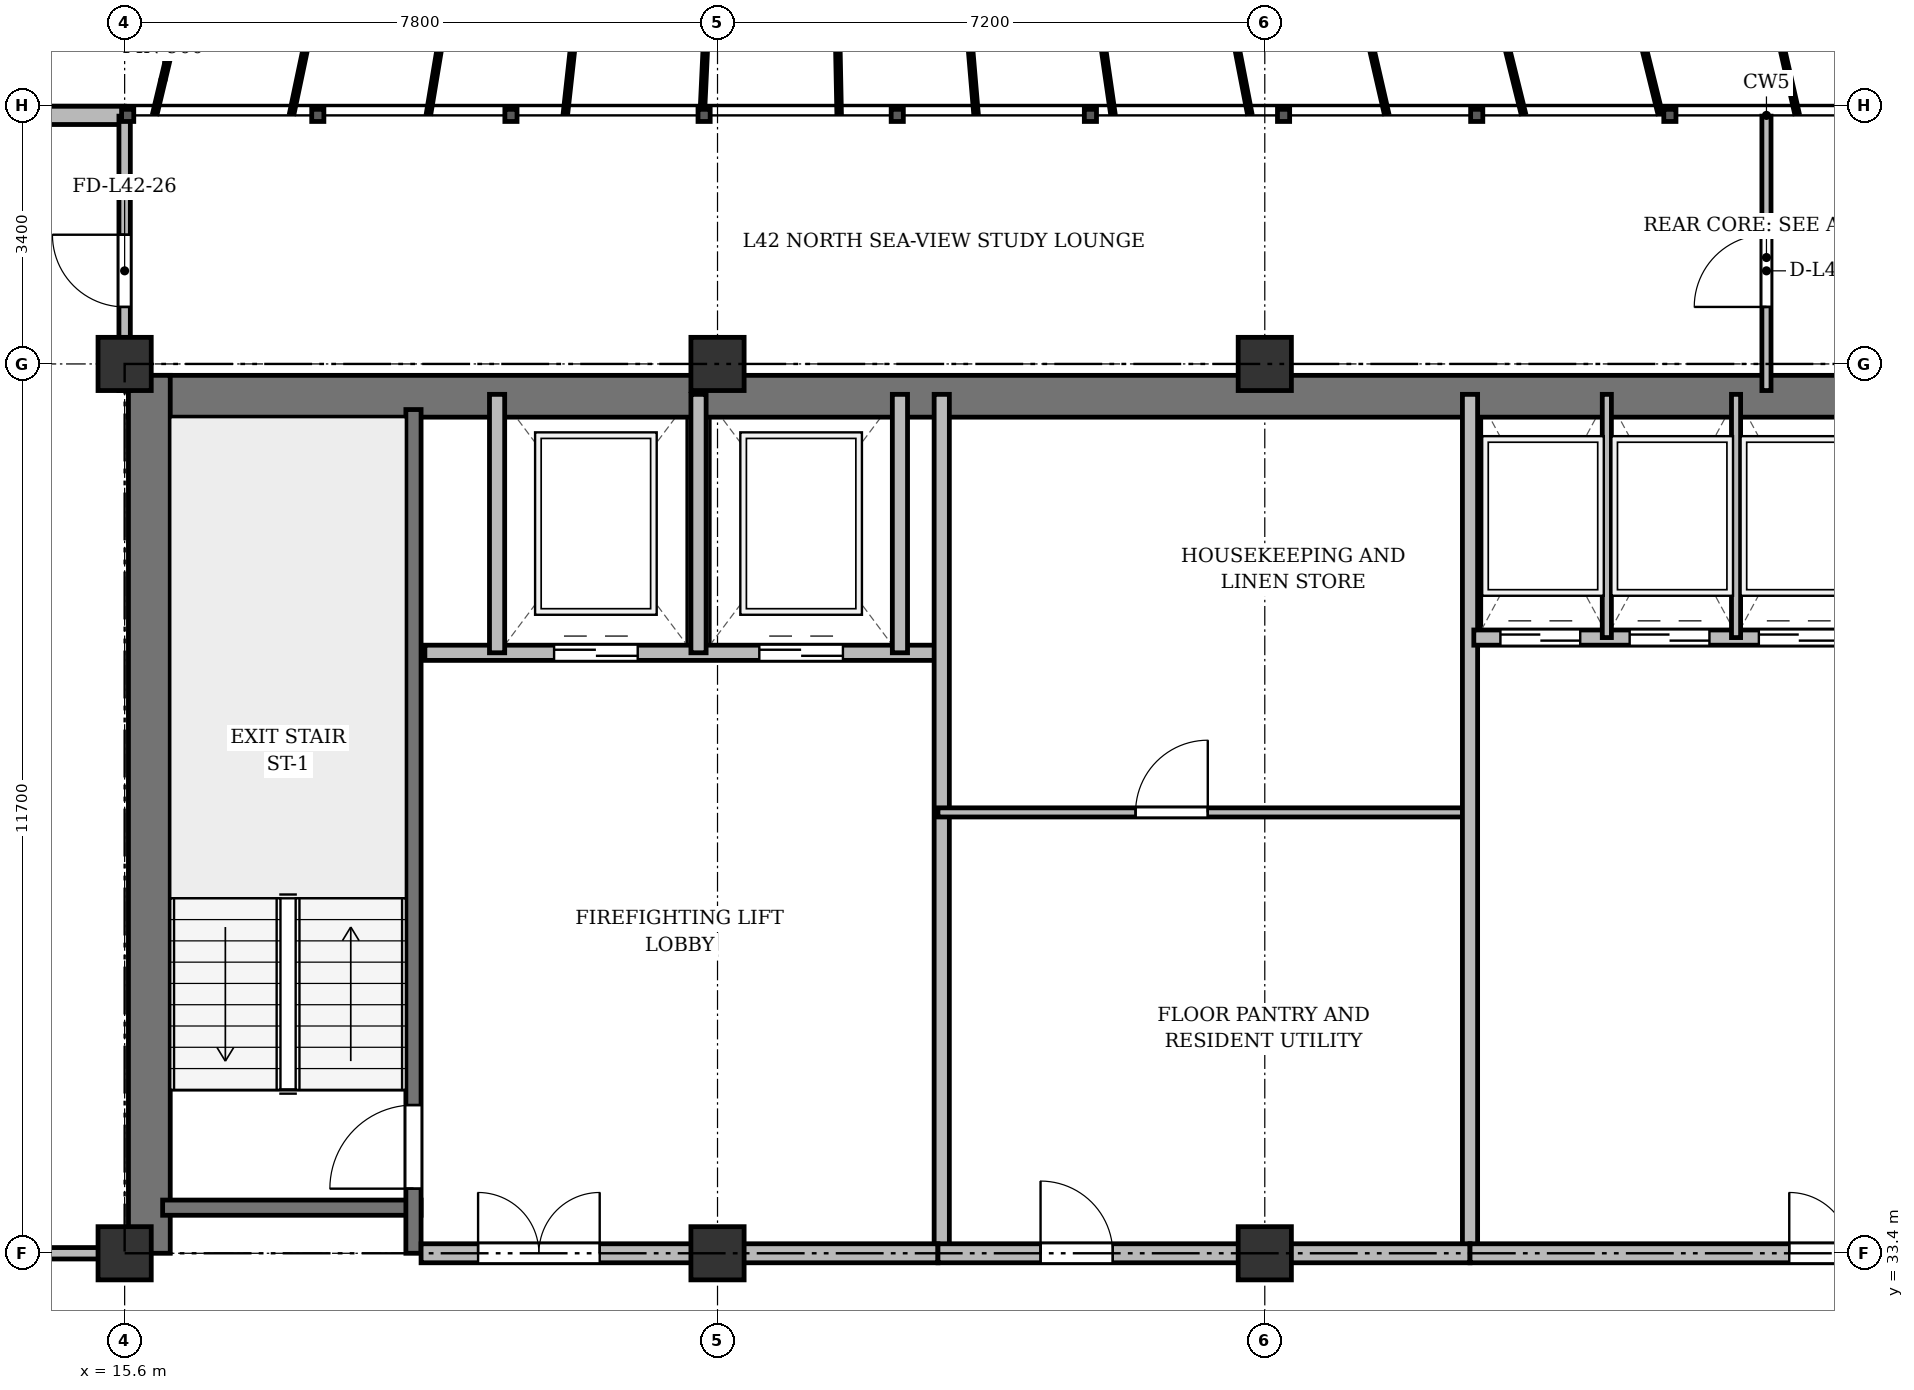
"""IFC4 building model, lengths in metres.
Left out: names, types, materials, properties, quantities, classifications, styles, units other than length and angle.
Written with IfcOpenShell. Run it as: python <this file> out.ifc"""

import sys

from ifc_helpers import new_model, si_unit, direction, frame, frame_2d, origin, origin_2d, place, context, subcontext, project, spatial, rectangle, extrude, source, transform, mapped, element, fill, save


model = new_model("IFC4")
c1 = context("Model", 3, precision=1e-05, world=origin(), true_north=direction((0.0, 1.0)))
c2 = subcontext(c1, "Body", "Model", "MODEL_VIEW")
j1 = project(units=[si_unit("LENGTHUNIT", "METRE"), si_unit("PLANEANGLEUNIT", "RADIAN")], contexts=[c1])
p1 = place(None, origin())
s1 = spatial("IfcSite", under=j1, at=p1, CompositionType="ELEMENT")
p2 = place(p1, origin())
s2 = spatial("IfcBuilding", under=s1, at=p2, CompositionType="ELEMENT")
p3 = place(p2, frame((0.0, 0.0, 160.9)))
s3 = spatial("IfcBuildingStorey", under=s2, at=p3, CompositionType="ELEMENT", Elevation=160.9)
m1 = source(origin(), c2, "Body", "SweptSolid", [
    extrude(rectangle(XDim=0.7, YDim=0.7, at=origin_2d()), origin(), (0.0, 0.0, 1.0), 3.6),
])
for number, where, z_axis, x_axis in (
    (1, (15.6, 33.4, 0.0), (0.0, 0.0, 1.0), (1.0, 0.0, 0.0)),
    (2, (15.6, 45.1, 0.0), (0.0, 0.0, 1.0), (1.0, 0.0, 0.0)),
    (3, (23.4, 33.4, 0.0), (0.0, 0.0, 1.0), (1.0, 0.0, 0.0)),
    (4, (23.4, 45.1, 0.0), (0.0, 0.0, 1.0), (1.0, 0.0, 0.0)),
    (5, (30.6, 33.4, 0.0), (0.0, 0.0, 1.0), (1.0, 0.0, 0.0)),
    (6, (30.6, 45.1, 0.0), (0.0, 0.0, 1.0), (1.0, 0.0, 0.0)),
):
    element("IfcColumn", number, at=place(p3, frame(where, z_axis=z_axis, x_axis=x_axis)), inside=s3, PredefinedType="COLUMN", context=c2, shape_type="MappedRepresentation", body=[
        mapped(m1, transform((0.0, 0.0, 0.0), x_axis=(1.0, 0.0, 0.0), y_axis=(0.0, 1.0, 0.0), z_axis=(0.0, 0.0, 1.0), scale=1.0)),
    ])
p4 = place(p3, frame((10.9, 48.37, 0.0), z_axis=(0.0, 0.0, 1.0), x_axis=(1.0, 0.0, 0.0)))
e7 = element("IfcWall", 7, at=p4, inside=s3, PredefinedType="SOLIDWALL", context=c2, shape_type="SweptSolid", body=[
    extrude(rectangle(XDim=4.7, YDim=0.24, at=frame_2d((2.35, 0.0))), origin(), (0.0, 0.0, 1.0), 3.35),
])
p5 = place(p4, frame((1.659, 0.0, 0.9)))
e8 = element("IfcOpeningElement", 8, at=p5, cuts=e7, PredefinedType="OPENING", context=c2, shape_type="SweptSolid", body=[
    extrude(rectangle(XDim=1.2, YDim=1.65, at=frame_2d((0.6, 0.825))), frame((0.0, 0.13, 0.0), z_axis=(0.0, -1.0, 0.0), x_axis=(1.0, 0.0, 0.0)), (0.0, 0.0, 1.0), 0.26),
])
p6 = place(p3, frame((15.65, 44.675, 0.0), z_axis=(0.0, 0.0, 1.0), x_axis=(1.0, 0.0, 0.0)))
e9 = element("IfcWall", 9, at=p6, inside=s3, PredefinedType="SHEAR", context=c2, shape_type="SweptSolid", body=[
    extrude(rectangle(XDim=43.1, YDim=0.55, at=frame_2d((21.55, 0.0))), origin(), (0.0, 0.0, 1.0), 3.35),
])
p7 = place(p3, frame((15.925, 33.4, 0.0), z_axis=(0.0, 0.0, 1.0), x_axis=(0.0, 1.0, 0.0)))
e10 = element("IfcWall", 10, at=p7, inside=s3, PredefinedType="SHEAR", context=c2, shape_type="SweptSolid", body=[
    extrude(rectangle(XDim=11.55, YDim=0.55, at=frame_2d((5.775, 0.0))), origin(), (0.0, 0.0, 1.0), 3.35),
])
p8 = place(p3, frame((16.1, 34.0, 0.0), z_axis=(0.0, 0.0, 1.0), x_axis=(1.0, 0.0, 0.0)))
e11 = element("IfcWall", 11, at=p8, inside=s3, PredefinedType="SHEAR", context=c2, shape_type="SweptSolid", body=[
    extrude(rectangle(XDim=3.4, YDim=0.2, at=frame_2d((1.7, 0.0))), origin(), (0.0, 0.0, 1.0), 3.35),
])
p9 = place(p3, frame((19.4, 33.4, 0.0), z_axis=(0.0, 0.0, 1.0), x_axis=(0.0, 1.0, 0.0)))
e12 = element("IfcWall", 12, at=p9, inside=s3, PredefinedType="SHEAR", context=c2, shape_type="SweptSolid", body=[
    extrude(rectangle(XDim=11.1, YDim=0.2, at=frame_2d((5.55, 0.0))), origin(), (0.0, 0.0, 1.0), 3.35),
])
p10 = place(p9, frame((0.85, 0.0, 0.0)))
e13 = element("IfcOpeningElement", 13, at=p10, cuts=e12, PredefinedType="OPENING", context=c2, shape_type="SweptSolid", body=[
    extrude(rectangle(XDim=1.1, YDim=2.15, at=frame_2d((0.55, 1.075))), frame((0.0, 0.11, 0.0), z_axis=(0.0, -1.0, 0.0), x_axis=(1.0, 0.0, 0.0)), (0.0, 0.0, 1.0), 0.22),
])
p11 = place(p3, frame((19.55, 41.3, 0.0), z_axis=(0.0, 0.0, 1.0), x_axis=(1.0, 0.0, 0.0)))
e14 = element("IfcWall", 14, at=p11, inside=s3, PredefinedType="SOLIDWALL", context=c2, shape_type="SweptSolid", body=[
    extrude(rectangle(XDim=6.75, YDim=0.2, at=frame_2d((3.375, 0.0))), origin(), (0.0, 0.0, 1.0), 3.35),
])
p12 = place(p11, frame((1.7, 0.0, 0.0)))
e15 = element("IfcOpeningElement", 15, at=p12, cuts=e14, PredefinedType="OPENING", context=c2, shape_type="SweptSolid", body=[
    extrude(rectangle(XDim=1.1, YDim=2.15, at=frame_2d((0.55, 1.075))), frame((0.0, 0.11, 0.0), z_axis=(0.0, -1.0, 0.0), x_axis=(1.0, 0.0, 0.0)), (0.0, 0.0, 1.0), 0.22),
])
p13 = place(p11, frame((4.4, 0.0, 0.0)))
e16 = element("IfcOpeningElement", 16, at=p13, cuts=e14, PredefinedType="OPENING", context=c2, shape_type="SweptSolid", body=[
    extrude(rectangle(XDim=1.1, YDim=2.15, at=frame_2d((0.55, 1.075))), frame((0.0, 0.11, 0.0), z_axis=(0.0, -1.0, 0.0), x_axis=(1.0, 0.0, 0.0)), (0.0, 0.0, 1.0), 0.22),
])
for number, where, z_axis, x_axis in (
    (17, (20.5, 41.3, 0.0), (0.0, 0.0, 1.0), (0.0, 1.0, 0.0)),
    (18, (23.15, 41.3, 0.0), (0.0, 0.0, 1.0), (0.0, 1.0, 0.0)),
    (19, (25.8, 41.3, 0.0), (0.0, 0.0, 1.0), (0.0, 1.0, 0.0)),
):
    element("IfcWall", number, at=place(p3, frame(where, z_axis=z_axis, x_axis=x_axis)), inside=s3, PredefinedType="SOLIDWALL", context=c2, shape_type="SweptSolid", body=[
        extrude(rectangle(XDim=3.4, YDim=0.2, at=frame_2d((1.7, 0.0))), origin(), (0.0, 0.0, 1.0), 3.35),
    ])
p14 = place(p3, frame((26.35, 33.4, 0.0), z_axis=(0.0, 0.0, 1.0), x_axis=(0.0, 1.0, 0.0)))
e20 = element("IfcWall", 20, at=p14, inside=s3, PredefinedType="SOLIDWALL", context=c2, shape_type="SweptSolid", body=[
    extrude(rectangle(XDim=11.3, YDim=0.2, at=frame_2d((5.65, 0.0))), origin(), (0.0, 0.0, 1.0), 2.75),
])
p15 = place(p3, frame((19.5, 33.4, 0.0), z_axis=(0.0, 0.0, 1.0), x_axis=(1.0, 0.0, 0.0)))
e21 = element("IfcWall", 21, at=p15, inside=s3, PredefinedType="PARTITIONING", context=c2, shape_type="SweptSolid", body=[
    extrude(rectangle(XDim=6.8, YDim=0.25, at=frame_2d((3.4, 0.0))), origin(), (0.0, 0.0, 1.0), 2.75),
])
p16 = place(p15, frame((0.75, 0.0, 0.0)))
e22 = element("IfcOpeningElement", 22, at=p16, cuts=e21, PredefinedType="OPENING", context=c2, shape_type="SweptSolid", body=[
    extrude(rectangle(XDim=1.6, YDim=2.2, at=frame_2d((0.8, 1.1))), frame((0.0, 0.135, 0.0), z_axis=(0.0, -1.0, 0.0), x_axis=(1.0, 0.0, 0.0)), (0.0, 0.0, 1.0), 0.27),
])
p17 = place(p3, frame((26.3, 39.2, 0.0), z_axis=(0.0, 0.0, 1.0), x_axis=(1.0, 0.0, 0.0)))
e23 = element("IfcWall", 23, at=p17, inside=s3, PredefinedType="PARTITIONING", context=c2, shape_type="SweptSolid", body=[
    extrude(rectangle(XDim=7.0, YDim=0.12, at=frame_2d((3.5, 0.0))), origin(), (0.0, 0.0, 1.0), 2.85),
])
p18 = place(p17, frame((2.6, 0.0, 0.0)))
e24 = element("IfcOpeningElement", 24, at=p18, cuts=e23, PredefinedType="OPENING", context=c2, shape_type="SweptSolid", body=[
    extrude(rectangle(XDim=0.95, YDim=2.15, at=frame_2d((0.475, 1.075))), frame((0.0, 0.07, 0.0), z_axis=(0.0, -1.0, 0.0), x_axis=(1.0, 0.0, 0.0)), (0.0, 0.0, 1.0), 0.14),
])
p19 = place(p3, frame((33.3, 33.4, 0.0), z_axis=(0.0, 0.0, 1.0), x_axis=(0.0, 1.0, 0.0)))
e25 = element("IfcWall", 25, at=p19, inside=s3, PredefinedType="SOLIDWALL", context=c2, shape_type="SweptSolid", body=[
    extrude(rectangle(XDim=11.3, YDim=0.2, at=frame_2d((5.65, 0.0))), origin(), (0.0, 0.0, 1.0), 2.75),
])
p20 = place(p3, frame((33.35, 41.5, 0.0), z_axis=(0.0, 0.0, 1.0), x_axis=(1.0, 0.0, 0.0)))
e26 = element("IfcWall", 26, at=p20, inside=s3, PredefinedType="SOLIDWALL", context=c2, shape_type="SweptSolid", body=[
    extrude(rectangle(XDim=6.9, YDim=0.2, at=frame_2d((3.45, 0.0))), origin(), (0.0, 0.0, 1.0), 3.35),
])
p21 = place(p20, frame((0.35, 0.0, 0.0)))
e27 = element("IfcOpeningElement", 27, at=p21, cuts=e26, PredefinedType="OPENING", context=c2, shape_type="SweptSolid", body=[
    extrude(rectangle(XDim=1.05, YDim=2.15, at=frame_2d((0.525, 1.075))), frame((0.0, 0.11, 0.0), z_axis=(0.0, -1.0, 0.0), x_axis=(1.0, 0.0, 0.0)), (0.0, 0.0, 1.0), 0.22),
])
p22 = place(p20, frame((2.05, 0.0, 0.0)))
e28 = element("IfcOpeningElement", 28, at=p22, cuts=e26, PredefinedType="OPENING", context=c2, shape_type="SweptSolid", body=[
    extrude(rectangle(XDim=1.05, YDim=2.15, at=frame_2d((0.525, 1.075))), frame((0.0, 0.11, 0.0), z_axis=(0.0, -1.0, 0.0), x_axis=(1.0, 0.0, 0.0)), (0.0, 0.0, 1.0), 0.22),
])
p23 = place(p20, frame((3.75, 0.0, 0.0)))
e29 = element("IfcOpeningElement", 29, at=p23, cuts=e26, PredefinedType="OPENING", context=c2, shape_type="SweptSolid", body=[
    extrude(rectangle(XDim=1.05, YDim=2.15, at=frame_2d((0.525, 1.075))), frame((0.0, 0.11, 0.0), z_axis=(0.0, -1.0, 0.0), x_axis=(1.0, 0.0, 0.0)), (0.0, 0.0, 1.0), 0.22),
])
p24 = place(p20, frame((5.45, 0.0, 0.0)))
e30 = element("IfcOpeningElement", 30, at=p24, cuts=e26, PredefinedType="OPENING", context=c2, shape_type="SweptSolid", body=[
    extrude(rectangle(XDim=1.05, YDim=2.15, at=frame_2d((0.525, 1.075))), frame((0.0, 0.11, 0.0), z_axis=(0.0, -1.0, 0.0), x_axis=(1.0, 0.0, 0.0)), (0.0, 0.0, 1.0), 0.22),
])
for number, where, z_axis, x_axis in (
    (31, (35.1, 41.5, 0.0), (0.0, 0.0, 1.0), (0.0, 1.0, 0.0)),
    (32, (36.8, 41.5, 0.0), (0.0, 0.0, 1.0), (0.0, 1.0, 0.0)),
):
    element("IfcWall", number, at=place(p3, frame(where, z_axis=z_axis, x_axis=x_axis)), inside=s3, PredefinedType="PARTITIONING", context=c2, shape_type="SweptSolid", body=[
        extrude(rectangle(XDim=3.2, YDim=0.12, at=frame_2d((1.6, 0.0))), origin(), (0.0, 0.0, 1.0), 3.35),
    ])
p25 = place(p3, frame((26.3, 33.4, 0.0), z_axis=(0.0, 0.0, 1.0), x_axis=(1.0, 0.0, 0.0)))
e33 = element("IfcWall", 33, at=p25, inside=s3, PredefinedType="PARTITIONING", context=c2, shape_type="SweptSolid", body=[
    extrude(rectangle(XDim=7.0, YDim=0.25, at=frame_2d((3.5, 0.0))), origin(), (0.0, 0.0, 1.0), 2.75),
])
p26 = place(p25, frame((1.35, 0.0, 0.0)))
e34 = element("IfcOpeningElement", 34, at=p26, cuts=e33, PredefinedType="OPENING", context=c2, shape_type="SweptSolid", body=[
    extrude(rectangle(XDim=0.95, YDim=2.15, at=frame_2d((0.475, 1.075))), frame((0.0, 0.135, 0.0), z_axis=(0.0, -1.0, 0.0), x_axis=(1.0, 0.0, 0.0)), (0.0, 0.0, 1.0), 0.27),
])
p27 = place(p3, frame((33.3, 33.4, 0.0), z_axis=(0.0, 0.0, 1.0), x_axis=(1.0, 0.0, 0.0)))
e35 = element("IfcWall", 35, at=p27, inside=s3, PredefinedType="PARTITIONING", context=c2, shape_type="SweptSolid", body=[
    extrude(rectangle(XDim=13.85, YDim=0.25, at=frame_2d((6.925, 0.0))), origin(), (0.0, 0.0, 1.0), 2.75),
])
p28 = place(p27, frame((4.2, 0.0, 0.0)))
e36 = element("IfcOpeningElement", 36, at=p28, cuts=e35, PredefinedType="OPENING", context=c2, shape_type="SweptSolid", body=[
    extrude(rectangle(XDim=1.6, YDim=2.2, at=frame_2d((0.8, 1.1))), frame((0.0, 0.135, 0.0), z_axis=(0.0, -1.0, 0.0), x_axis=(1.0, 0.0, 0.0)), (0.0, 0.0, 1.0), 0.27),
])
p29 = place(p3, frame((8.05, 33.4, 0.0), z_axis=(0.0, 0.0, 1.0), x_axis=(1.0, 0.0, 0.0)))
e37 = element("IfcWall", 37, at=p29, inside=s3, PredefinedType="PARTITIONING", context=c2, shape_type="SweptSolid", body=[
    extrude(rectangle(XDim=7.55, YDim=0.15, at=frame_2d((3.775, 0.0))), origin(), (0.0, 0.0, 1.0), 2.75),
])
p30 = place(p29, frame((3.2, 0.0, 0.0)))
e38 = element("IfcOpeningElement", 38, at=p30, cuts=e37, PredefinedType="OPENING", context=c2, shape_type="SweptSolid", body=[
    extrude(rectangle(XDim=0.95, YDim=2.15, at=frame_2d((0.475, 1.075))), frame((0.0, 0.085, 0.0), z_axis=(0.0, -1.0, 0.0), x_axis=(1.0, 0.0, 0.0)), (0.0, 0.0, 1.0), 0.17),
])
p31 = place(p3, frame((37.2, 44.75, 0.0), z_axis=(0.0, 0.0, 1.0), x_axis=(0.0, 1.0, 0.0)))
e39 = element("IfcWall", 39, at=p31, inside=s3, PredefinedType="PARTITIONING", context=c2, shape_type="SweptSolid", body=[
    extrude(rectangle(XDim=3.61, YDim=0.12, at=frame_2d((1.805, 0.0))), origin(), (0.0, 0.0, 1.0), 2.75),
])
p32 = place(p31, frame((1.1, 0.0, 0.0)))
e40 = element("IfcOpeningElement", 40, at=p32, cuts=e39, PredefinedType="OPENING", context=c2, shape_type="SweptSolid", body=[
    extrude(rectangle(XDim=0.95, YDim=2.15, at=frame_2d((0.475, 1.075))), frame((0.0, 0.07, 0.0), z_axis=(0.0, -1.0, 0.0), x_axis=(1.0, 0.0, 0.0)), (0.0, 0.0, 1.0), 0.14),
])
p33 = place(p3, frame((15.6, 44.75, 0.0), z_axis=(0.0, 0.0, 1.0), x_axis=(0.0, 1.0, 0.0)))
e41 = element("IfcWall", 41, at=p33, inside=s3, PredefinedType="PARTITIONING", context=c2, shape_type="SweptSolid", body=[
    extrude(rectangle(XDim=3.61, YDim=0.15, at=frame_2d((1.805, 0.0))), origin(), (0.0, 0.0, 1.0), 2.85),
])
p34 = place(p33, frame((1.1, 0.0, 0.0)))
e42 = element("IfcOpeningElement", 42, at=p34, cuts=e41, PredefinedType="OPENING", context=c2, shape_type="SweptSolid", body=[
    extrude(rectangle(XDim=0.95, YDim=2.15, at=frame_2d((0.475, 1.075))), frame((0.0, 0.085, 0.0), z_axis=(0.0, -1.0, 0.0), x_axis=(1.0, 0.0, 0.0)), (0.0, 0.0, 1.0), 0.17),
])
m2 = source(origin(), c2, "Body", "SweptSolid", [
    extrude(rectangle(XDim=1.1, YDim=2.15, at=frame_2d((0.55, 1.075))), frame((0.0, 0.025, 0.0), z_axis=(0.0, -1.0, 0.0), x_axis=(1.0, 0.0, 0.0)), (0.0, 0.0, 1.0), 0.05),
])
p35 = place(p10, origin())
e43 = element("IfcDoor", 43, at=p35, inside=s3, OperationType="SINGLE_SWING_LEFT", PredefinedType="DOOR", context=c2, shape_type="MappedRepresentation", body=[
    mapped(m2, transform((0.0, 0.0, 0.0), x_axis=(1.0, 0.0, 0.0), y_axis=(0.0, 1.0, 0.0), z_axis=(0.0, 0.0, 1.0), scale=1.0)),
])
fill(e13, e43)
p36 = place(p12, origin())
e44 = element("IfcDoor", 44, at=p36, inside=s3, OperationType="DOUBLE_DOOR_SLIDING", PredefinedType="DOOR", context=c2, shape_type="MappedRepresentation", body=[
    mapped(m2, transform((0.0, 0.0, 0.0), x_axis=(1.0, 0.0, 0.0), y_axis=(0.0, 1.0, 0.0), z_axis=(0.0, 0.0, 1.0), scale=1.0)),
])
fill(e15, e44)
p37 = place(p13, origin())
e45 = element("IfcDoor", 45, at=p37, inside=s3, OperationType="DOUBLE_DOOR_SLIDING", PredefinedType="DOOR", context=c2, shape_type="MappedRepresentation", body=[
    mapped(m2, transform((0.0, 0.0, 0.0), x_axis=(1.0, 0.0, 0.0), y_axis=(0.0, 1.0, 0.0), z_axis=(0.0, 0.0, 1.0), scale=1.0)),
])
fill(e16, e45)
m3 = source(origin(), c2, "Body", "SweptSolid", [
    extrude(rectangle(XDim=1.6, YDim=2.2, at=frame_2d((0.8, 1.1))), frame((0.0, 0.025, 0.0), z_axis=(0.0, -1.0, 0.0), x_axis=(1.0, 0.0, 0.0)), (0.0, 0.0, 1.0), 0.05),
])
p38 = place(p16, origin())
e46 = element("IfcDoor", 46, at=p38, inside=s3, OperationType="DOUBLE_DOOR_SINGLE_SWING", PredefinedType="DOOR", context=c2, shape_type="MappedRepresentation", body=[
    mapped(m3, transform((0.0, 0.0, 0.0), x_axis=(1.0, 0.0, 0.0), y_axis=(0.0, 1.0, 0.0), z_axis=(0.0, 0.0, 1.0), scale=1.0)),
])
fill(e22, e46)
m4 = source(origin(), c2, "Body", "SweptSolid", [
    extrude(rectangle(XDim=0.95, YDim=2.15, at=frame_2d((0.475, 1.075))), frame((0.0, 0.025, 0.0), z_axis=(0.0, -1.0, 0.0), x_axis=(1.0, 0.0, 0.0)), (0.0, 0.0, 1.0), 0.05),
])
p39 = place(p18, origin())
e47 = element("IfcDoor", 47, at=p39, inside=s3, OperationType="SINGLE_SWING_RIGHT", PredefinedType="DOOR", context=c2, shape_type="MappedRepresentation", body=[
    mapped(m4, transform((0.0, 0.0, 0.0), x_axis=(1.0, 0.0, 0.0), y_axis=(0.0, 1.0, 0.0), z_axis=(0.0, 0.0, 1.0), scale=1.0)),
])
fill(e24, e47)
m5 = source(origin(), c2, "Body", "SweptSolid", [
    extrude(rectangle(XDim=1.05, YDim=2.15, at=frame_2d((0.525, 1.075))), frame((0.0, 0.025, 0.0), z_axis=(0.0, -1.0, 0.0), x_axis=(1.0, 0.0, 0.0)), (0.0, 0.0, 1.0), 0.05),
])
p40 = place(p21, origin())
e48 = element("IfcDoor", 48, at=p40, inside=s3, OperationType="DOUBLE_DOOR_SLIDING", PredefinedType="DOOR", context=c2, shape_type="MappedRepresentation", body=[
    mapped(m5, transform((0.0, 0.0, 0.0), x_axis=(1.0, 0.0, 0.0), y_axis=(0.0, 1.0, 0.0), z_axis=(0.0, 0.0, 1.0), scale=1.0)),
])
fill(e27, e48)
p41 = place(p22, origin())
e49 = element("IfcDoor", 49, at=p41, inside=s3, OperationType="DOUBLE_DOOR_SLIDING", PredefinedType="DOOR", context=c2, shape_type="MappedRepresentation", body=[
    mapped(m5, transform((0.0, 0.0, 0.0), x_axis=(1.0, 0.0, 0.0), y_axis=(0.0, 1.0, 0.0), z_axis=(0.0, 0.0, 1.0), scale=1.0)),
])
fill(e28, e49)
p42 = place(p23, origin())
e50 = element("IfcDoor", 50, at=p42, inside=s3, OperationType="DOUBLE_DOOR_SLIDING", PredefinedType="DOOR", context=c2, shape_type="MappedRepresentation", body=[
    mapped(m5, transform((0.0, 0.0, 0.0), x_axis=(1.0, 0.0, 0.0), y_axis=(0.0, 1.0, 0.0), z_axis=(0.0, 0.0, 1.0), scale=1.0)),
])
fill(e29, e50)
p43 = place(p26, origin())
e51 = element("IfcDoor", 51, at=p43, inside=s3, OperationType="SINGLE_SWING_LEFT", PredefinedType="DOOR", context=c2, shape_type="MappedRepresentation", body=[
    mapped(m4, transform((0.0, 0.0, 0.0), x_axis=(1.0, 0.0, 0.0), y_axis=(0.0, 1.0, 0.0), z_axis=(0.0, 0.0, 1.0), scale=1.0)),
])
fill(e34, e51)
p44 = place(p28, origin())
e52 = element("IfcDoor", 52, at=p44, inside=s3, OperationType="DOUBLE_DOOR_SINGLE_SWING", PredefinedType="DOOR", context=c2, shape_type="MappedRepresentation", body=[
    mapped(m3, transform((0.0, 0.0, 0.0), x_axis=(1.0, 0.0, 0.0), y_axis=(0.0, 1.0, 0.0), z_axis=(0.0, 0.0, 1.0), scale=1.0)),
])
fill(e36, e52)
p45 = place(p32, origin())
e53 = element("IfcDoor", 53, at=p45, inside=s3, OperationType="SINGLE_SWING_LEFT", PredefinedType="DOOR", context=c2, shape_type="MappedRepresentation", body=[
    mapped(m4, transform((0.0, 0.0, 0.0), x_axis=(1.0, 0.0, 0.0), y_axis=(0.0, 1.0, 0.0), z_axis=(0.0, 0.0, 1.0), scale=1.0)),
])
fill(e40, e53)
p46 = place(p34, origin())
e54 = element("IfcDoor", 54, at=p46, inside=s3, OperationType="SINGLE_SWING_RIGHT", PredefinedType="DOOR", context=c2, shape_type="MappedRepresentation", body=[
    mapped(m4, transform((0.0, 0.0, 0.0), x_axis=(1.0, 0.0, 0.0), y_axis=(0.0, 1.0, 0.0), z_axis=(0.0, 0.0, 1.0), scale=1.0)),
])
fill(e42, e54)
save(model, sys.argv[1])
